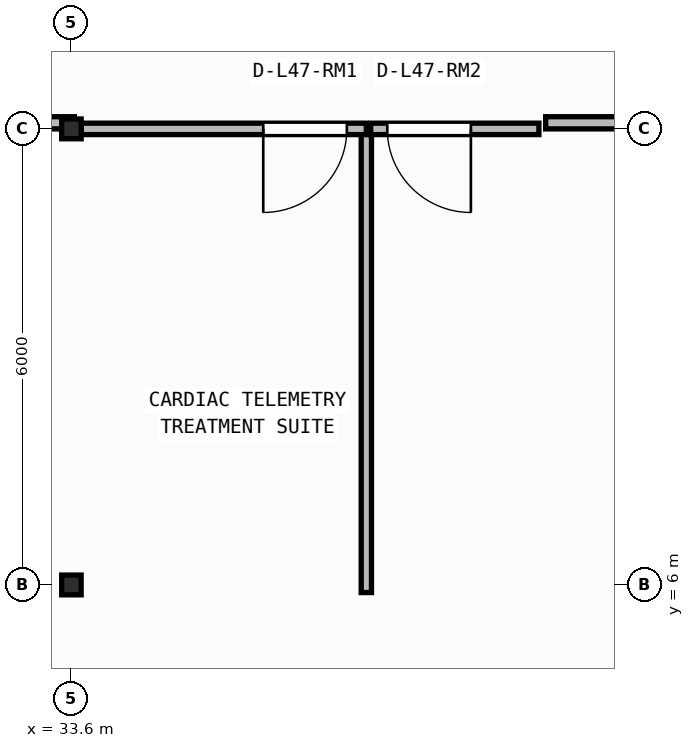
"""IFC4 building model, lengths in metres.
Left out: names, types, materials, properties, quantities, classifications, styles, units other than length and angle.
Written with IfcOpenShell. Run it as: python <this file> out.ifc"""

import sys

from ifc_helpers import new_model, si_unit, direction, frame, frame_2d, origin, origin_2d, place, context, subcontext, project, spatial, rectangle, i_section, extrude, element, fill, save


model = new_model("IFC4")
c1 = context("Model", 3, precision=1e-05, world=origin(), true_north=direction((0.0, 1.0)))
c2 = subcontext(c1, "Body", "Model", "MODEL_VIEW")
j1 = project(units=[si_unit("LENGTHUNIT", "METRE"), si_unit("PLANEANGLEUNIT", "RADIAN")], contexts=[c1])
p1 = place(None, origin())
s1 = spatial("IfcSite", under=j1, at=p1, CompositionType="ELEMENT")
p2 = place(p1, origin())
s2 = spatial("IfcBuilding", under=s1, at=p2, CompositionType="ELEMENT")
p3 = place(p2, frame((0.0, 0.0, 192.1)))
s3 = spatial("IfcBuildingStorey", under=s2, at=p3, CompositionType="ELEMENT", Elevation=192.1)
for number, where, z_axis, x_axis in (
    (1, (33.6, 6.0, 0.0), (0.0, 0.0, 1.0), (1.0, 0.0, 0.0)),
    (2, (33.6, 12.0, 0.0), (0.0, 0.0, 1.0), (1.0, 0.0, 0.0)),
):
    element("IfcColumn", number, at=place(p3, frame(where, z_axis=z_axis, x_axis=x_axis)), inside=s3, PredefinedType="COLUMN", context=c2, shape_type="SweptSolid", body=[
        extrude(i_section(OverallWidth=0.256, OverallDepth=0.26, WebThickness=0.01, FlangeThickness=0.017, FilletRadius=0.013, at=origin_2d()), origin(), (0.0, 0.0, 1.0), 3.95),
    ])
p4 = place(p3, frame((37.48, 5.9, 0.0), z_axis=(0.0, 0.0, 1.0), x_axis=(0.0, 1.0, 0.0)))
e3 = element("IfcWall", 3, at=p4, inside=s3, PredefinedType="PARTITIONING", context=c2, shape_type="SweptSolid", body=[
    extrude(rectangle(XDim=6.1, YDim=0.135, at=frame_2d((3.05, 0.0))), origin(), (0.0, 0.0, 1.0), 3.71),
])
p5 = place(p3, frame((37.48, 12.0, 0.0), z_axis=(0.0, 0.0, 1.0), x_axis=(-1.0, 0.0, 0.0)))
e4 = element("IfcWall", 4, at=p5, inside=s3, PredefinedType="PARTITIONING", context=c2, shape_type="SweptSolid", body=[
    extrude(rectangle(XDim=3.752, YDim=0.15, at=frame_2d((1.876, 0.0))), origin(), (0.0, 0.0, 1.0), 3.152),
])
p6 = place(p5, frame((0.256, 0.0, 0.0)))
e5 = element("IfcOpeningElement", 5, at=p6, cuts=e4, PredefinedType="OPENING", context=c2, shape_type="SweptSolid", body=[
    extrude(rectangle(XDim=1.1, YDim=2.1, at=frame_2d((0.55, 1.05))), frame((0.0, 0.085, 0.0), z_axis=(0.0, -1.0, 0.0), x_axis=(1.0, 0.0, 0.0)), (0.0, 0.0, 1.0), 0.17),
])
p7 = place(p3, frame((39.75, 12.0, 0.0), z_axis=(0.0, 0.0, 1.0), x_axis=(-1.0, 0.0, 0.0)))
e6 = element("IfcWall", 6, at=p7, inside=s3, PredefinedType="PARTITIONING", context=c2, shape_type="SweptSolid", body=[
    extrude(rectangle(XDim=2.212, YDim=0.15, at=frame_2d((1.106, 0.0))), origin(), (0.0, 0.0, 1.0), 3.152),
])
p8 = place(p7, frame((0.895, 0.0, 0.0)))
e7 = element("IfcOpeningElement", 7, at=p8, cuts=e6, PredefinedType="OPENING", context=c2, shape_type="SweptSolid", body=[
    extrude(rectangle(XDim=1.1, YDim=2.1, at=frame_2d((0.55, 1.05))), frame((0.0, 0.085, 0.0), z_axis=(0.0, -1.0, 0.0), x_axis=(1.0, 0.0, 0.0)), (0.0, 0.0, 1.0), 0.17),
])
p9 = place(p3, frame((31.439, 12.08, 0.0), z_axis=(0.0, 0.0, 1.0), x_axis=(1.0, 0.0, 0.0)))
e8 = element("IfcWall", 8, at=p9, inside=s3, PredefinedType="PARTITIONING", context=c2, shape_type="SweptSolid", body=[
    extrude(rectangle(XDim=2.199, YDim=0.16, at=frame_2d((1.1, 0.0))), origin(), (0.0, 0.0, 1.0), 3.152),
])
p10 = place(p3, frame((39.839, 12.08, 0.0), z_axis=(0.0, 0.0, 1.0), x_axis=(1.0, 0.0, 0.0)))
e9 = element("IfcWall", 9, at=p10, inside=s3, PredefinedType="PARTITIONING", context=c2, shape_type="SweptSolid", body=[
    extrude(rectangle(XDim=1.871, YDim=0.16, at=frame_2d((0.936, 0.0))), origin(), (0.0, 0.0, 1.0), 3.152),
])
p11 = place(p6, origin())
e10 = element("IfcDoor", 10, at=p11, inside=s3, OperationType="SINGLE_SWING_RIGHT", PredefinedType="DOOR", context=c2, shape_type="SweptSolid", body=[
    extrude(rectangle(XDim=1.1, YDim=2.1, at=frame_2d((0.55, 1.05))), frame((0.0, 0.025, 0.0), z_axis=(0.0, -1.0, 0.0), x_axis=(1.0, 0.0, 0.0)), (0.0, 0.0, 1.0), 0.05),
])
fill(e5, e10)
p12 = place(p8, origin())
e11 = element("IfcDoor", 11, at=p12, inside=s3, OperationType="SINGLE_SWING_LEFT", PredefinedType="DOOR", context=c2, shape_type="SweptSolid", body=[
    extrude(rectangle(XDim=1.1, YDim=2.1, at=frame_2d((0.55, 1.05))), frame((0.0, 0.025, 0.0), z_axis=(0.0, -1.0, 0.0), x_axis=(1.0, 0.0, 0.0)), (0.0, 0.0, 1.0), 0.05),
])
fill(e7, e11)
save(model, sys.argv[1])
